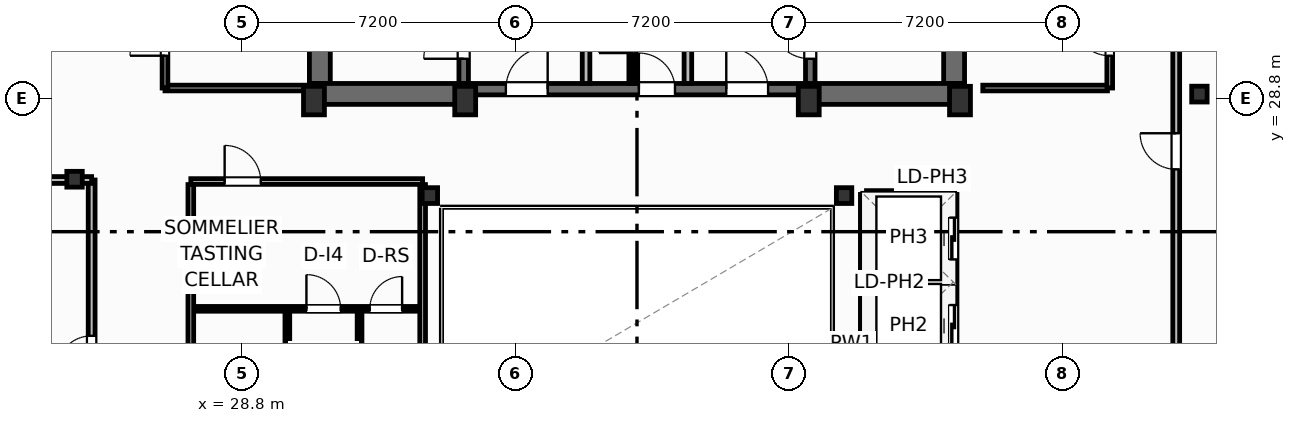
"""IFC4 building model, lengths in metres.
Left out: names, types, materials, properties, quantities, classifications, styles, units other than length and angle.
Written with IfcOpenShell. Run it as: python <this file> out.ifc"""

import sys

from ifc_helpers import new_model, si_unit, direction, frame, frame_2d, origin, origin_2d, place, context, subcontext, project, spatial, rectangle, i_section, extrude, element, fill, save


model = new_model("IFC4")
c1 = context("Model", 3, precision=1e-05, world=origin(), true_north=direction((0.0, 1.0)))
c2 = subcontext(c1, "Body", "Model", "MODEL_VIEW")
j1 = project(units=[si_unit("LENGTHUNIT", "METRE"), si_unit("PLANEANGLEUNIT", "RADIAN")], contexts=[c1])
p1 = place(None, origin())
s1 = spatial("IfcSite", under=j1, at=p1, CompositionType="ELEMENT")
p2 = place(p1, origin())
s2 = spatial("IfcBuilding", under=s1, at=p2, CompositionType="ELEMENT")
p3 = place(p2, frame((0.0, 0.0, 258.2)))
s3 = spatial("IfcBuildingStorey", under=s2, at=p3, CompositionType="ELEMENT", Elevation=258.2)
for number, where, z_axis, x_axis in (
    (1, (30.7, 28.75, 0.0), (0.0, 0.0, 1.0), (1.0, 0.0, 0.0)),
    (2, (34.68, 28.75, 0.0), (0.0, 0.0, 1.0), (1.0, 0.0, 0.0)),
    (3, (43.72, 28.75, 0.0), (0.0, 0.0, 1.0), (1.0, 0.0, 0.0)),
    (4, (47.7, 28.75, 0.0), (0.0, 0.0, 1.0), (1.0, 0.0, 0.0)),
):
    element("IfcColumn", number, at=place(p3, frame(where, z_axis=z_axis, x_axis=x_axis)), inside=s3, PredefinedType="COLUMN", context=c2, shape_type="SweptSolid", body=[
        extrude(rectangle(XDim=0.55, YDim=0.75, at=origin_2d()), origin(), (0.0, 0.0, 1.0), 3.7),
    ])
for number, where, z_axis, x_axis in (
    (5, (33.75, 26.25, 0.0), (0.0, 0.0, 1.0), (1.0, 0.0, 0.0)),
    (6, (44.65, 26.25, 0.0), (0.0, 0.0, 1.0), (1.0, 0.0, 0.0)),
    (7, (24.4, 26.68, 0.0), (0.0, 0.0, 1.0), (1.0, 0.0, 0.0)),
    (8, (54.0, 28.92, 0.0), (0.0, 0.0, 1.0), (1.0, 0.0, 0.0)),
):
    element("IfcColumn", number, at=place(p3, frame(where, z_axis=z_axis, x_axis=x_axis)), inside=s3, PredefinedType="COLUMN", context=c2, shape_type="SweptSolid", body=[
        extrude(i_section(OverallWidth=0.406, OverallDepth=0.416, WebThickness=0.03, FlangeThickness=0.048, FilletRadius=0.025, at=origin_2d()), origin(), (0.0, 0.0, 1.0), 3.7),
    ])
for number, where, z_axis, x_axis in (
    (9, (30.855, 29.2, 0.0), (0.0, 0.0, 1.0), (0.0, 1.0, 0.0)),
    (10, (47.545, 29.2, 0.0), (0.0, 0.0, 1.0), (0.0, 1.0, 0.0)),
):
    element("IfcWall", number, at=place(p3, frame(where, z_axis=z_axis, x_axis=x_axis)), inside=s3, PredefinedType="SHEAR", context=c2, shape_type="SweptSolid", body=[
        extrude(rectangle(XDim=9.22, YDim=0.55, at=frame_2d((4.61, 0.0))), origin(), (0.0, 0.0, 1.0), 3.45),
    ])
for number, where, z_axis, x_axis in (
    (11, (30.58, 28.925, 0.0), (0.0, 0.0, 1.0), (1.0, 0.0, 0.0)),
    (12, (43.6, 28.925, 0.0), (0.0, 0.0, 1.0), (1.0, 0.0, 0.0)),
):
    element("IfcWall", number, at=place(p3, frame(where, z_axis=z_axis, x_axis=x_axis)), inside=s3, PredefinedType="SHEAR", context=c2, shape_type="SweptSolid", body=[
        extrude(rectangle(XDim=4.22, YDim=0.55, at=frame_2d((2.11, 0.0))), origin(), (0.0, 0.0, 1.0), 3.45),
    ])
p4 = place(p3, frame((34.8, 29.05, 0.0), z_axis=(0.0, 0.0, 1.0), x_axis=(1.0, 0.0, 0.0)))
e13 = element("IfcWall", 13, at=p4, inside=s3, PredefinedType="SHEAR", context=c2, shape_type="SweptSolid", body=[
    extrude(rectangle(XDim=8.8, YDim=0.3, at=frame_2d((4.4, 0.0))), origin(), (0.0, 0.0, 1.0), 3.45),
])
p5 = place(p4, frame((0.95, 0.0, 0.0)))
e14 = element("IfcOpeningElement", 14, at=p5, cuts=e13, PredefinedType="OPENING", context=c2, shape_type="SweptSolid", body=[
    extrude(rectangle(XDim=1.1, YDim=2.15, at=frame_2d((0.55, 1.075))), frame((0.0, 0.16, 0.0), z_axis=(0.0, -1.0, 0.0), x_axis=(1.0, 0.0, 0.0)), (0.0, 0.0, 1.0), 0.32),
])
p6 = place(p4, frame((6.75, 0.0, 0.0)))
e15 = element("IfcOpeningElement", 15, at=p6, cuts=e13, PredefinedType="OPENING", context=c2, shape_type="SweptSolid", body=[
    extrude(rectangle(XDim=1.1, YDim=2.15, at=frame_2d((0.55, 1.075))), frame((0.0, 0.16, 0.0), z_axis=(0.0, -1.0, 0.0), x_axis=(1.0, 0.0, 0.0)), (0.0, 0.0, 1.0), 0.32),
])
p7 = place(p4, frame((4.45, 0.0, 0.0)))
e16 = element("IfcOpeningElement", 16, at=p7, cuts=e13, PredefinedType="OPENING", context=c2, shape_type="SweptSolid", body=[
    extrude(rectangle(XDim=0.95, YDim=2.15, at=frame_2d((0.475, 1.075))), frame((0.0, 0.16, 0.0), z_axis=(0.0, -1.0, 0.0), x_axis=(1.0, 0.0, 0.0)), (0.0, 0.0, 1.0), 0.32),
])
p8 = place(p3, frame((34.64, 29.2, 0.0), z_axis=(0.0, 0.0, 1.0), x_axis=(0.0, 1.0, 0.0)))
e17 = element("IfcWall", 17, at=p8, inside=s3, PredefinedType="SHEAR", context=c2, shape_type="SweptSolid", body=[
    extrude(rectangle(XDim=9.22, YDim=0.25, at=frame_2d((4.61, 0.0))), origin(), (0.0, 0.0, 1.0), 3.45),
])
p9 = place(p8, frame((0.65, 0.0, 0.0)))
e18 = element("IfcOpeningElement", 18, at=p9, cuts=e17, PredefinedType="OPENING", context=c2, shape_type="SweptSolid", body=[
    extrude(rectangle(XDim=1.05, YDim=2.15, at=frame_2d((0.525, 1.075))), frame((0.0, 0.135, 0.0), z_axis=(0.0, -1.0, 0.0), x_axis=(1.0, 0.0, 0.0)), (0.0, 0.0, 1.0), 0.27),
])
p10 = place(p3, frame((43.76, 29.2, 0.0), z_axis=(0.0, 0.0, 1.0), x_axis=(0.0, 1.0, 0.0)))
e19 = element("IfcWall", 19, at=p10, inside=s3, PredefinedType="SHEAR", context=c2, shape_type="SweptSolid", body=[
    extrude(rectangle(XDim=9.22, YDim=0.25, at=frame_2d((4.61, 0.0))), origin(), (0.0, 0.0, 1.0), 3.45),
])
p11 = place(p10, frame((0.65, 0.0, 0.0)))
e20 = element("IfcOpeningElement", 20, at=p11, cuts=e19, PredefinedType="OPENING", context=c2, shape_type="SweptSolid", body=[
    extrude(rectangle(XDim=1.05, YDim=2.15, at=frame_2d((0.525, 1.075))), frame((0.0, 0.135, 0.0), z_axis=(0.0, -1.0, 0.0), x_axis=(1.0, 0.0, 0.0)), (0.0, 0.0, 1.0), 0.27),
])
p12 = place(p3, frame((24.85, 19.24, 0.0), z_axis=(0.0, 0.0, 1.0), x_axis=(0.0, 1.0, 0.0)))
e21 = element("IfcWall", 21, at=p12, inside=s3, PredefinedType="PARTITIONING", context=c2, shape_type="SweptSolid", body=[
    extrude(rectangle(XDim=7.42, YDim=0.18, at=frame_2d((3.71, 0.0))), origin(), (0.0, 0.0, 1.0), 3.45),
])
p13 = place(p12, frame((2.4, 0.0, 0.0)))
e22 = element("IfcOpeningElement", 22, at=p13, cuts=e21, PredefinedType="OPENING", context=c2, shape_type="SweptSolid", body=[
    extrude(rectangle(XDim=0.92, YDim=2.05, at=frame_2d((0.46, 1.025))), frame((0.0, 0.1, 0.0), z_axis=(0.0, -1.0, 0.0), x_axis=(1.0, 0.0, 0.0)), (0.0, 0.0, 1.0), 0.2),
])
p14 = place(p3, frame((5.107, 26.66, 0.0), z_axis=(0.0, 0.0, 1.0), x_axis=(1.0, 0.0, 0.0)))
e23 = element("IfcWall", 23, at=p14, inside=s3, PredefinedType="PARTITIONING", context=c2, shape_type="SweptSolid", body=[
    extrude(rectangle(XDim=19.743, YDim=0.18, at=frame_2d((9.872, 0.0))), origin(), (0.0, 0.0, 1.0), 2.662),
])
p15 = place(p3, frame((53.39, 19.24, 0.0), z_axis=(0.0, 0.0, 1.0), x_axis=(0.0, 1.0, 0.0)))
e24 = element("IfcWall", 24, at=p15, inside=s3, PredefinedType="PARTITIONING", context=c2, shape_type="SweptSolid", body=[
    extrude(rectangle(XDim=20.06, YDim=0.18, at=frame_2d((10.03, 0.0))), origin(), (0.0, 0.0, 1.0), 3.45),
])
p16 = place(p15, frame((7.7, 0.0, 0.0)))
e25 = element("IfcOpeningElement", 25, at=p16, cuts=e24, PredefinedType="OPENING", context=c2, shape_type="SweptSolid", body=[
    extrude(rectangle(XDim=0.95, YDim=2.05, at=frame_2d((0.475, 1.025))), frame((0.0, 0.1, 0.0), z_axis=(0.0, -1.0, 0.0), x_axis=(1.0, 0.0, 0.0)), (0.0, 0.0, 1.0), 0.2),
])
for number, where, z_axis, x_axis in (
    (26, (37.86, 29.2, 0.0), (0.0, 0.0, 1.0), (0.0, 1.0, 0.0)),
    (27, (40.54, 29.2, 0.0), (0.0, 0.0, 1.0), (0.0, 1.0, 0.0)),
):
    element("IfcWall", number, at=place(p3, frame(where, z_axis=z_axis, x_axis=x_axis)), inside=s3, PredefinedType="PARTITIONING", context=c2, shape_type="SweptSolid", body=[
        extrude(rectangle(XDim=5.18, YDim=0.2, at=frame_2d((2.59, 0.0))), origin(), (0.0, 0.0, 1.0), 3.45),
    ])
p17 = place(p3, frame((39.05, 29.2, 0.0), z_axis=(0.0, 0.0, 1.0), x_axis=(0.0, 1.0, 0.0)))
e28 = element("IfcWall", 28, at=p17, inside=s3, PredefinedType="PARTITIONING", context=c2, shape_type="SweptSolid", body=[
    extrude(rectangle(XDim=5.22, YDim=0.125, at=frame_2d((2.61, 0.0))), origin(), (0.0, 0.0, 1.0), 3.45),
])
p18 = place(p17, frame((0.8, 0.0, 0.0)))
e29 = element("IfcOpeningElement", 29, at=p18, cuts=e28, PredefinedType="OPENING", context=c2, shape_type="SweptSolid", body=[
    extrude(rectangle(XDim=0.85, YDim=2.05, at=frame_2d((0.425, 1.025))), frame((0.0, 0.073, 0.0), z_axis=(0.0, -1.0, 0.0), x_axis=(1.0, 0.0, 0.0)), (0.0, 0.0, 1.0), 0.145),
])
p19 = place(p17, frame((3.4, 0.0, 0.0)))
e30 = element("IfcOpeningElement", 30, at=p19, cuts=e28, PredefinedType="OPENING", context=c2, shape_type="SweptSolid", body=[
    extrude(rectangle(XDim=0.85, YDim=2.05, at=frame_2d((0.425, 1.025))), frame((0.0, 0.073, 0.0), z_axis=(0.0, -1.0, 0.0), x_axis=(1.0, 0.0, 0.0)), (0.0, 0.0, 1.0), 0.145),
])
p20 = place(p3, frame((27.46, 26.62, 0.0), z_axis=(0.0, 0.0, 1.0), x_axis=(1.0, 0.0, 0.0)))
e31 = element("IfcWall", 31, at=p20, inside=s3, PredefinedType="PARTITIONING", context=c2, shape_type="SweptSolid", body=[
    extrude(rectangle(XDim=6.1, YDim=0.15, at=frame_2d((3.05, 0.0))), origin(), (0.0, 0.0, 1.0), 2.662),
])
p21 = place(p20, frame((0.89, 0.0, 0.0)))
e32 = element("IfcOpeningElement", 32, at=p21, cuts=e31, PredefinedType="OPENING", context=c2, shape_type="SweptSolid", body=[
    extrude(rectangle(XDim=0.95, YDim=2.05, at=frame_2d((0.475, 1.025))), frame((0.0, 0.085, 0.0), z_axis=(0.0, -1.0, 0.0), x_axis=(1.0, 0.0, 0.0)), (0.0, 0.0, 1.0), 0.17),
])
p22 = place(p3, frame((27.52, 23.27, 0.0), z_axis=(0.0, 0.0, 1.0), x_axis=(1.0, 0.0, 0.0)))
e33 = element("IfcWall", 33, at=p22, inside=s3, PredefinedType="PARTITIONING", context=c2, shape_type="SweptSolid", body=[
    extrude(rectangle(XDim=6.0, YDim=0.125, at=frame_2d((3.0, 0.0))), origin(), (0.0, 0.0, 1.0), 3.45),
])
p23 = place(p22, frame((2.982, 0.0, 0.0)))
e34 = element("IfcOpeningElement", 34, at=p23, cuts=e33, PredefinedType="OPENING", context=c2, shape_type="SweptSolid", body=[
    extrude(rectangle(XDim=0.9, YDim=2.05, at=frame_2d((0.45, 1.025))), frame((0.0, 0.073, 0.0), z_axis=(0.0, -1.0, 0.0), x_axis=(1.0, 0.0, 0.0)), (0.0, 0.0, 1.0), 0.145),
])
p24 = place(p22, frame((4.65, 0.0, 0.0)))
e35 = element("IfcOpeningElement", 35, at=p24, cuts=e33, PredefinedType="OPENING", context=c2, shape_type="SweptSolid", body=[
    extrude(rectangle(XDim=0.85, YDim=2.05, at=frame_2d((0.425, 1.025))), frame((0.0, 0.073, 0.0), z_axis=(0.0, -1.0, 0.0), x_axis=(1.0, 0.0, 0.0)), (0.0, 0.0, 1.0), 0.145),
])
for number, where, z_axis, x_axis in (
    (36, (30.0, 19.38, 0.0), (0.0, 0.0, 1.0), (0.0, 1.0, 0.0)),
    (37, (31.9, 19.38, 0.0), (0.0, 0.0, 1.0), (0.0, 1.0, 0.0)),
):
    element("IfcWall", number, at=place(p3, frame(where, z_axis=z_axis, x_axis=x_axis)), inside=s3, PredefinedType="PARTITIONING", context=c2, shape_type="SweptSolid", body=[
        extrude(rectangle(XDim=3.82, YDim=0.125, at=frame_2d((1.91, 0.0))), origin(), (0.0, 0.0, 1.0), 3.45),
    ])
p25 = place(p3, frame((27.46, 19.38, 0.0), z_axis=(0.0, 0.0, 1.0), x_axis=(0.0, 1.0, 0.0)))
e38 = element("IfcWall", 38, at=p25, inside=s3, PredefinedType="PARTITIONING", context=c2, shape_type="SweptSolid", body=[
    extrude(rectangle(XDim=7.16, YDim=0.15, at=frame_2d((3.58, 0.0))), origin(), (0.0, 0.0, 1.0), 3.45),
])
p26 = place(p25, frame((1.1, 0.0, 0.0)))
e39 = element("IfcOpeningElement", 39, at=p26, cuts=e38, PredefinedType="OPENING", context=c2, shape_type="SweptSolid", body=[
    extrude(rectangle(XDim=0.9, YDim=2.05, at=frame_2d((0.45, 1.025))), frame((0.0, 0.085, 0.0), z_axis=(0.0, -1.0, 0.0), x_axis=(1.0, 0.0, 0.0)), (0.0, 0.0, 1.0), 0.17),
])
p27 = place(p3, frame((33.56, 19.38, 0.0), z_axis=(0.0, 0.0, 1.0), x_axis=(0.0, 1.0, 0.0)))
e40 = element("IfcWall", 40, at=p27, inside=s3, PredefinedType="PARTITIONING", context=c2, shape_type="SweptSolid", body=[
    extrude(rectangle(XDim=7.16, YDim=0.15, at=frame_2d((3.58, 0.0))), origin(), (0.0, 0.0, 1.0), 2.824),
])
p28 = place(p3, frame((26.78, 29.08, 0.0), z_axis=(0.0, 0.0, 1.0), x_axis=(1.0, 0.0, 0.0)))
e41 = element("IfcWall", 41, at=p28, inside=s3, PredefinedType="PARTITIONING", context=c2, shape_type="SweptSolid", body=[
    extrude(rectangle(XDim=3.8, YDim=0.15, at=frame_2d((1.9, 0.0))), origin(), (0.0, 0.0, 1.0), 3.45),
])
p29 = place(p3, frame((26.78, 29.08, 0.0), z_axis=(0.0, 0.0, 1.0), x_axis=(0.0, 1.0, 0.0)))
e42 = element("IfcWall", 42, at=p29, inside=s3, PredefinedType="PARTITIONING", context=c2, shape_type="SweptSolid", body=[
    extrude(rectangle(XDim=5.87, YDim=0.15, at=frame_2d((2.935, 0.0))), origin(), (0.0, 0.0, 1.0), 3.45),
])
p30 = place(p29, frame((0.85, 0.0, 0.0)))
e43 = element("IfcOpeningElement", 43, at=p30, cuts=e42, PredefinedType="OPENING", context=c2, shape_type="SweptSolid", body=[
    extrude(rectangle(XDim=0.92, YDim=2.05, at=frame_2d((0.46, 1.025))), frame((0.0, 0.085, 0.0), z_axis=(0.0, -1.0, 0.0), x_axis=(1.0, 0.0, 0.0)), (0.0, 0.0, 1.0), 0.17),
])
p31 = place(p29, frame((3.45, 0.0, 0.0)))
e44 = element("IfcOpeningElement", 44, at=p31, cuts=e42, PredefinedType="OPENING", context=c2, shape_type="SweptSolid", body=[
    extrude(rectangle(XDim=0.85, YDim=2.05, at=frame_2d((0.425, 1.025))), frame((0.0, 0.085, 0.0), z_axis=(0.0, -1.0, 0.0), x_axis=(1.0, 0.0, 0.0)), (0.0, 0.0, 1.0), 0.17),
])
p32 = place(p3, frame((48.3, 29.08, 0.0), z_axis=(0.0, 0.0, 1.0), x_axis=(1.0, 0.0, 0.0)))
e45 = element("IfcWall", 45, at=p32, inside=s3, PredefinedType="PARTITIONING", context=c2, shape_type="SweptSolid", body=[
    extrude(rectangle(XDim=3.28, YDim=0.15, at=frame_2d((1.64, 0.0))), origin(), (0.0, 0.0, 1.0), 2.662),
])
p33 = place(p3, frame((51.64, 29.08, 0.0), z_axis=(0.0, 0.0, 1.0), x_axis=(0.0, 1.0, 0.0)))
e46 = element("IfcWall", 46, at=p33, inside=s3, PredefinedType="PARTITIONING", context=c2, shape_type="SweptSolid", body=[
    extrude(rectangle(XDim=6.88, YDim=0.15, at=frame_2d((3.44, 0.0))), origin(), (0.0, 0.0, 1.0), 3.45),
])
p34 = place(p33, frame((0.85, 0.0, 0.0)))
e47 = element("IfcOpeningElement", 47, at=p34, cuts=e46, PredefinedType="OPENING", context=c2, shape_type="SweptSolid", body=[
    extrude(rectangle(XDim=0.95, YDim=2.05, at=frame_2d((0.475, 1.025))), frame((0.0, 0.085, 0.0), z_axis=(0.0, -1.0, 0.0), x_axis=(1.0, 0.0, 0.0)), (0.0, 0.0, 1.0), 0.17),
])
for number, where, z_axis, x_axis in (
    (48, (45.24, 23.975, 0.0), (0.0, 0.0, 1.0), (1.0, 0.0, 0.0)),
    (49, (45.24, 26.28, 0.0), (0.0, 0.0, 1.0), (1.0, 0.0, 0.0)),
):
    element("IfcWall", number, at=place(p3, frame(where, z_axis=z_axis, x_axis=x_axis)), inside=s3, PredefinedType="PARTITIONING", context=c2, shape_type="SweptSolid", body=[
        extrude(rectangle(XDim=2.22, YDim=0.2, at=frame_2d((1.11, 0.0))), origin(), (0.0, 0.0, 1.0), 3.45),
    ])
p35 = place(p3, frame((45.18, 19.38, 0.0), z_axis=(0.0, 0.0, 1.0), x_axis=(0.0, 1.0, 0.0)))
e50 = element("IfcWall", 50, at=p35, inside=s3, PredefinedType="PARTITIONING", context=c2, shape_type="SweptSolid", body=[
    extrude(rectangle(XDim=6.9, YDim=0.2, at=frame_2d((3.45, 0.0))), origin(), (0.0, 0.0, 1.0), 3.45),
])
p36 = place(p3, frame((47.52, 19.38, 0.0), z_axis=(0.0, 0.0, 1.0), x_axis=(0.0, 1.0, 0.0)))
e51 = element("IfcWall", 51, at=p36, inside=s3, PredefinedType="PARTITIONING", context=c2, shape_type="SweptSolid", body=[
    extrude(rectangle(XDim=6.9, YDim=0.2, at=frame_2d((3.45, 0.0))), origin(), (0.0, 0.0, 1.0), 3.45),
])
p37 = place(p36, frame((0.59, 0.0, 0.0)))
e52 = element("IfcOpeningElement", 52, at=p37, cuts=e51, PredefinedType="OPENING", context=c2, shape_type="SweptSolid", body=[
    extrude(rectangle(XDim=1.1, YDim=2.15, at=frame_2d((0.55, 1.075))), frame((0.0, 0.11, 0.0), z_axis=(0.0, -1.0, 0.0), x_axis=(1.0, 0.0, 0.0)), (0.0, 0.0, 1.0), 0.22),
])
p38 = place(p36, frame((2.89, 0.0, 0.0)))
e53 = element("IfcOpeningElement", 53, at=p38, cuts=e51, PredefinedType="OPENING", context=c2, shape_type="SweptSolid", body=[
    extrude(rectangle(XDim=1.1, YDim=2.15, at=frame_2d((0.55, 1.075))), frame((0.0, 0.11, 0.0), z_axis=(0.0, -1.0, 0.0), x_axis=(1.0, 0.0, 0.0)), (0.0, 0.0, 1.0), 0.22),
])
p39 = place(p36, frame((5.19, 0.0, 0.0)))
e54 = element("IfcOpeningElement", 54, at=p39, cuts=e51, PredefinedType="OPENING", context=c2, shape_type="SweptSolid", body=[
    extrude(rectangle(XDim=1.1, YDim=2.15, at=frame_2d((0.55, 1.075))), frame((0.0, 0.11, 0.0), z_axis=(0.0, -1.0, 0.0), x_axis=(1.0, 0.0, 0.0)), (0.0, 0.0, 1.0), 0.22),
])
p40 = place(p13, origin())
e55 = element("IfcDoor", 55, at=p40, inside=s3, OperationType="SINGLE_SWING_LEFT", PredefinedType="DOOR", context=c2, shape_type="SweptSolid", body=[
    extrude(rectangle(XDim=0.92, YDim=2.05, at=frame_2d((0.46, 1.025))), frame((0.0, 0.025, 0.0), z_axis=(0.0, -1.0, 0.0), x_axis=(1.0, 0.0, 0.0)), (0.0, 0.0, 1.0), 0.05),
])
fill(e22, e55)
p41 = place(p16, origin())
e56 = element("IfcDoor", 56, at=p41, inside=s3, OperationType="SINGLE_SWING_RIGHT", PredefinedType="DOOR", context=c2, shape_type="SweptSolid", body=[
    extrude(rectangle(XDim=0.95, YDim=2.05, at=frame_2d((0.475, 1.025))), frame((0.0, 0.025, 0.0), z_axis=(0.0, -1.0, 0.0), x_axis=(1.0, 0.0, 0.0)), (0.0, 0.0, 1.0), 0.05),
])
fill(e25, e56)
p42 = place(p9, origin())
e57 = element("IfcDoor", 57, at=p42, inside=s3, OperationType="SINGLE_SWING_LEFT", PredefinedType="DOOR", context=c2, shape_type="SweptSolid", body=[
    extrude(rectangle(XDim=1.05, YDim=2.15, at=frame_2d((0.525, 1.075))), frame((0.0, 0.025, 0.0), z_axis=(0.0, -1.0, 0.0), x_axis=(1.0, 0.0, 0.0)), (0.0, 0.0, 1.0), 0.05),
])
fill(e18, e57)
p43 = place(p11, origin())
e58 = element("IfcDoor", 58, at=p43, inside=s3, OperationType="SINGLE_SWING_RIGHT", PredefinedType="DOOR", context=c2, shape_type="SweptSolid", body=[
    extrude(rectangle(XDim=1.05, YDim=2.15, at=frame_2d((0.525, 1.075))), frame((0.0, 0.025, 0.0), z_axis=(0.0, -1.0, 0.0), x_axis=(1.0, 0.0, 0.0)), (0.0, 0.0, 1.0), 0.05),
])
fill(e20, e58)
p44 = place(p5, origin())
e59 = element("IfcDoor", 59, at=p44, inside=s3, OperationType="SINGLE_SWING_RIGHT", PredefinedType="DOOR", context=c2, shape_type="SweptSolid", body=[
    extrude(rectangle(XDim=1.1, YDim=2.15, at=frame_2d((0.55, 1.075))), frame((0.0, 0.025, 0.0), z_axis=(0.0, -1.0, 0.0), x_axis=(1.0, 0.0, 0.0)), (0.0, 0.0, 1.0), 0.05),
])
fill(e14, e59)
p45 = place(p6, origin())
e60 = element("IfcDoor", 60, at=p45, inside=s3, OperationType="SINGLE_SWING_LEFT", PredefinedType="DOOR", context=c2, shape_type="SweptSolid", body=[
    extrude(rectangle(XDim=1.1, YDim=2.15, at=frame_2d((0.55, 1.075))), frame((0.0, 0.025, 0.0), z_axis=(0.0, -1.0, 0.0), x_axis=(1.0, 0.0, 0.0)), (0.0, 0.0, 1.0), 0.05),
])
fill(e15, e60)
p46 = place(p18, origin())
e61 = element("IfcDoor", 61, at=p46, inside=s3, OperationType="SINGLE_SWING_LEFT", PredefinedType="DOOR", context=c2, shape_type="SweptSolid", body=[
    extrude(rectangle(XDim=0.85, YDim=2.05, at=frame_2d((0.425, 1.025))), frame((0.0, 0.025, 0.0), z_axis=(0.0, -1.0, 0.0), x_axis=(1.0, 0.0, 0.0)), (0.0, 0.0, 1.0), 0.05),
])
fill(e29, e61)
p47 = place(p7, origin())
e62 = element("IfcDoor", 62, at=p47, inside=s3, OperationType="SINGLE_SWING_LEFT", PredefinedType="DOOR", context=c2, shape_type="SweptSolid", body=[
    extrude(rectangle(XDim=0.95, YDim=2.15, at=frame_2d((0.475, 1.075))), frame((0.0, 0.025, 0.0), z_axis=(0.0, -1.0, 0.0), x_axis=(1.0, 0.0, 0.0)), (0.0, 0.0, 1.0), 0.05),
])
fill(e16, e62)
p48 = place(p21, origin())
e63 = element("IfcDoor", 63, at=p48, inside=s3, OperationType="SINGLE_SWING_LEFT", PredefinedType="DOOR", context=c2, shape_type="SweptSolid", body=[
    extrude(rectangle(XDim=0.95, YDim=2.05, at=frame_2d((0.475, 1.025))), frame((0.0, 0.025, 0.0), z_axis=(0.0, -1.0, 0.0), x_axis=(1.0, 0.0, 0.0)), (0.0, 0.0, 1.0), 0.05),
])
fill(e32, e63)
p49 = place(p23, origin())
e64 = element("IfcDoor", 64, at=p49, inside=s3, OperationType="SINGLE_SWING_LEFT", PredefinedType="DOOR", context=c2, shape_type="SweptSolid", body=[
    extrude(rectangle(XDim=0.9, YDim=2.05, at=frame_2d((0.45, 1.025))), frame((0.0, 0.025, 0.0), z_axis=(0.0, -1.0, 0.0), x_axis=(1.0, 0.0, 0.0)), (0.0, 0.0, 1.0), 0.05),
])
fill(e34, e64)
p50 = place(p24, origin())
e65 = element("IfcDoor", 65, at=p50, inside=s3, OperationType="SINGLE_SWING_RIGHT", PredefinedType="DOOR", context=c2, shape_type="SweptSolid", body=[
    extrude(rectangle(XDim=0.85, YDim=2.05, at=frame_2d((0.425, 1.025))), frame((0.0, 0.025, 0.0), z_axis=(0.0, -1.0, 0.0), x_axis=(1.0, 0.0, 0.0)), (0.0, 0.0, 1.0), 0.05),
])
fill(e35, e65)
p51 = place(p30, origin())
e66 = element("IfcDoor", 66, at=p51, inside=s3, OperationType="SINGLE_SWING_LEFT", PredefinedType="DOOR", context=c2, shape_type="SweptSolid", body=[
    extrude(rectangle(XDim=0.92, YDim=2.05, at=frame_2d((0.46, 1.025))), frame((0.0, 0.025, 0.0), z_axis=(0.0, -1.0, 0.0), x_axis=(1.0, 0.0, 0.0)), (0.0, 0.0, 1.0), 0.05),
])
fill(e43, e66)
p52 = place(p34, origin())
e67 = element("IfcDoor", 67, at=p52, inside=s3, OperationType="SINGLE_SWING_RIGHT", PredefinedType="DOOR", context=c2, shape_type="SweptSolid", body=[
    extrude(rectangle(XDim=0.95, YDim=2.05, at=frame_2d((0.475, 1.025))), frame((0.0, 0.025, 0.0), z_axis=(0.0, -1.0, 0.0), x_axis=(1.0, 0.0, 0.0)), (0.0, 0.0, 1.0), 0.05),
])
fill(e47, e67)
p53 = place(p38, origin())
e68 = element("IfcDoor", 68, at=p53, inside=s3, OperationType="SLIDING_TO_LEFT", PredefinedType="DOOR", context=c2, shape_type="SweptSolid", body=[
    extrude(rectangle(XDim=1.1, YDim=2.15, at=frame_2d((0.55, 1.075))), frame((0.0, 0.025, 0.0), z_axis=(0.0, -1.0, 0.0), x_axis=(1.0, 0.0, 0.0)), (0.0, 0.0, 1.0), 0.05),
])
fill(e53, e68)
p54 = place(p39, origin())
e69 = element("IfcDoor", 69, at=p54, inside=s3, OperationType="SLIDING_TO_LEFT", PredefinedType="DOOR", context=c2, shape_type="SweptSolid", body=[
    extrude(rectangle(XDim=1.1, YDim=2.15, at=frame_2d((0.55, 1.075))), frame((0.0, 0.025, 0.0), z_axis=(0.0, -1.0, 0.0), x_axis=(1.0, 0.0, 0.0)), (0.0, 0.0, 1.0), 0.05),
])
fill(e54, e69)
save(model, sys.argv[1])
